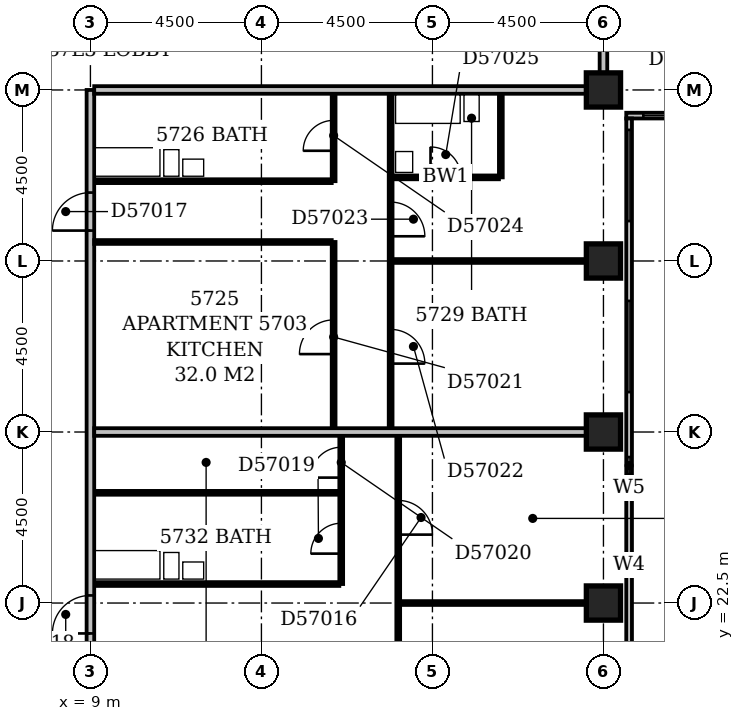
"""IFC4 building model, lengths in metres.
Left out: names, types, materials, properties, quantities, classifications, styles, units other than length and angle.
Written with IfcOpenShell. Run it as: python <this file> out.ifc"""

import sys

from ifc_helpers import new_model, si_unit, direction, frame, frame_2d, origin, origin_2d, place, context, subcontext, project, spatial, rectangle, extrude, element, fill, save


model = new_model("IFC4")
c1 = context("Model", 3, precision=1e-05, world=origin(), true_north=direction((0.0, 1.0)))
c2 = subcontext(c1, "Body", "Model", "MODEL_VIEW")
j1 = project(units=[si_unit("LENGTHUNIT", "METRE"), si_unit("PLANEANGLEUNIT", "RADIAN")], contexts=[c1])
p1 = place(None, origin())
s1 = spatial("IfcSite", under=j1, at=p1, CompositionType="ELEMENT")
p2 = place(p1, origin())
s2 = spatial("IfcBuilding", under=s1, at=p2, CompositionType="ELEMENT")
p3 = place(p2, frame((0.0, 0.0, 222.2)))
s3 = spatial("IfcBuildingStorey", under=s2, at=p3, CompositionType="ELEMENT", Elevation=222.2)
for number, where, z_axis, x_axis in (
    (1, (22.5, 22.5, -0.3), (0.0, 0.0, 1.0), (1.0, 0.0, 0.0)),
    (2, (22.5, 27.0, -0.3), (0.0, 0.0, 1.0), (1.0, 0.0, 0.0)),
    (3, (22.5, 31.5, -0.3), (0.0, 0.0, 1.0), (1.0, 0.0, 0.0)),
    (4, (22.5, 36.0, -0.3), (0.0, 0.0, 1.0), (1.0, 0.0, 0.0)),
):
    element("IfcColumn", number, at=place(p3, frame(where, z_axis=z_axis, x_axis=x_axis)), inside=s3, PredefinedType="COLUMN", context=c2, shape_type="SweptSolid", body=[
        extrude(rectangle(XDim=0.9, YDim=0.9, at=origin_2d()), origin(), (0.0, 0.0, 1.0), 3.6),
    ])
p4 = place(p3, frame((23.175, 17.4, 0.0), z_axis=(0.0, 0.0, 1.0), x_axis=(0.0, 1.0, 0.0)))
e5 = element("IfcWall", 5, at=p4, inside=s3, PredefinedType="STANDARD", context=c2, shape_type="SweptSolid", body=[
    extrude(rectangle(XDim=17.85, YDim=0.15, at=frame_2d((8.925, 0.0))), origin(), (0.0, 0.0, 1.0), 2.7),
])
p5 = place(p4, frame((1.65, 0.0, 0.6)))
e6 = element("IfcOpeningElement", 6, at=p5, cuts=e5, PredefinedType="OPENING", context=c2, shape_type="SweptSolid", body=[
    extrude(rectangle(XDim=2.4, YDim=1.8, at=frame_2d((1.2, 0.9))), frame((0.0, 0.087, 0.0), z_axis=(0.0, -1.0, 0.0), x_axis=(1.0, 0.0, 0.0)), (0.0, 0.0, 1.0), 0.174),
])
p6 = place(p4, frame((5.798, 0.0, 0.6)))
e7 = element("IfcOpeningElement", 7, at=p6, cuts=e5, PredefinedType="OPENING", context=c2, shape_type="SweptSolid", body=[
    extrude(rectangle(XDim=0.6, YDim=1.8, at=frame_2d((0.3, 0.9))), frame((0.0, 0.087, 0.0), z_axis=(0.0, -1.0, 0.0), x_axis=(1.0, 0.0, 0.0)), (0.0, 0.0, 1.0), 0.174),
])
p7 = place(p4, frame((8.491, 0.0, 0.6)))
e8 = element("IfcOpeningElement", 8, at=p7, cuts=e5, PredefinedType="OPENING", context=c2, shape_type="SweptSolid", body=[
    extrude(rectangle(XDim=0.45, YDim=1.8, at=frame_2d((0.225, 0.9))), frame((0.0, 0.087, 0.0), z_axis=(0.0, -1.0, 0.0), x_axis=(1.0, 0.0, 0.0)), (0.0, 0.0, 1.0), 0.174),
])
p8 = place(p4, frame((10.65, 0.0, 0.6)))
e9 = element("IfcOpeningElement", 9, at=p8, cuts=e5, PredefinedType="OPENING", context=c2, shape_type="SweptSolid", body=[
    extrude(rectangle(XDim=2.4, YDim=1.8, at=frame_2d((1.2, 0.9))), frame((0.0, 0.087, 0.0), z_axis=(0.0, -1.0, 0.0), x_axis=(1.0, 0.0, 0.0)), (0.0, 0.0, 1.0), 0.174),
])
p9 = place(p4, frame((15.15, 0.0, 0.6)))
e10 = element("IfcOpeningElement", 10, at=p9, cuts=e5, PredefinedType="OPENING", context=c2, shape_type="SweptSolid", body=[
    extrude(rectangle(XDim=2.4, YDim=1.8, at=frame_2d((1.2, 0.9))), frame((0.0, 0.087, 0.0), z_axis=(0.0, -1.0, 0.0), x_axis=(1.0, 0.0, 0.0)), (0.0, 0.0, 1.0), 0.174),
])
p10 = place(p3, frame((23.1, 35.325, 0.0), z_axis=(0.0, 0.0, 1.0), x_axis=(1.0, 0.0, 0.0)))
e11 = element("IfcWall", 11, at=p10, inside=s3, PredefinedType="STANDARD", context=c2, shape_type="SweptSolid", body=[
    extrude(rectangle(XDim=27.15, YDim=0.15, at=frame_2d((13.575, 0.0))), origin(), (0.0, 0.0, 1.0), 2.7),
])
p11 = place(p10, frame((0.45, 0.0, 0.6)))
e12 = element("IfcOpeningElement", 12, at=p11, cuts=e11, PredefinedType="OPENING", context=c2, shape_type="SweptSolid", body=[
    extrude(rectangle(XDim=2.4, YDim=1.8, at=frame_2d((1.2, 0.9))), frame((0.0, 0.087, 0.0), z_axis=(0.0, -1.0, 0.0), x_axis=(1.0, 0.0, 0.0)), (0.0, 0.0, 1.0), 0.174),
])
p12 = place(p10, frame((6.234, 0.0, 0.6)))
e13 = element("IfcOpeningElement", 13, at=p12, cuts=e11, PredefinedType="OPENING", context=c2, shape_type="SweptSolid", body=[
    extrude(rectangle(XDim=1.5, YDim=1.8, at=frame_2d((0.75, 0.9))), frame((0.0, 0.087, 0.0), z_axis=(0.0, -1.0, 0.0), x_axis=(1.0, 0.0, 0.0)), (0.0, 0.0, 1.0), 0.174),
])
p13 = place(p10, frame((9.45, 0.0, 0.6)))
e14 = element("IfcOpeningElement", 14, at=p13, cuts=e11, PredefinedType="OPENING", context=c2, shape_type="SweptSolid", body=[
    extrude(rectangle(XDim=2.4, YDim=1.8, at=frame_2d((1.2, 0.9))), frame((0.0, 0.087, 0.0), z_axis=(0.0, -1.0, 0.0), x_axis=(1.0, 0.0, 0.0)), (0.0, 0.0, 1.0), 0.174),
])
p14 = place(p10, frame((13.95, 0.0, 0.6)))
e15 = element("IfcOpeningElement", 15, at=p14, cuts=e11, PredefinedType="OPENING", context=c2, shape_type="SweptSolid", body=[
    extrude(rectangle(XDim=2.4, YDim=1.8, at=frame_2d((1.2, 0.9))), frame((0.0, 0.087, 0.0), z_axis=(0.0, -1.0, 0.0), x_axis=(1.0, 0.0, 0.0)), (0.0, 0.0, 1.0), 0.174),
])
p15 = place(p10, frame((18.18, 0.0, 0.6)))
e16 = element("IfcOpeningElement", 16, at=p15, cuts=e11, PredefinedType="OPENING", context=c2, shape_type="SweptSolid", body=[
    extrude(rectangle(XDim=1.8, YDim=1.8, at=frame_2d((0.9, 0.9))), frame((0.0, 0.087, 0.0), z_axis=(0.0, -1.0, 0.0), x_axis=(1.0, 0.0, 0.0)), (0.0, 0.0, 1.0), 0.174),
])
p16 = place(p10, frame((22.95, 0.0, 0.6)))
e17 = element("IfcOpeningElement", 17, at=p16, cuts=e11, PredefinedType="OPENING", context=c2, shape_type="SweptSolid", body=[
    extrude(rectangle(XDim=2.4, YDim=1.8, at=frame_2d((1.2, 0.9))), frame((0.0, 0.087, 0.0), z_axis=(0.0, -1.0, 0.0), x_axis=(1.0, 0.0, 0.0)), (0.0, 0.0, 1.0), 0.174),
])
p17 = place(p3, frame((17.1, 17.4, 0.0), z_axis=(0.0, 0.0, 1.0), x_axis=(0.0, 1.0, 0.0)))
e18 = element("IfcWall", 18, at=p17, inside=s3, PredefinedType="PARTITIONING", context=c2, shape_type="SweptSolid", body=[
    extrude(rectangle(XDim=9.5, YDim=0.1, at=frame_2d((4.75, 0.0))), origin(), (0.0, 0.0, 1.0), 3.3),
])
p18 = place(p17, frame((2.4, 0.0, 0.0)))
e19 = element("IfcOpeningElement", 19, at=p18, cuts=e18, PredefinedType="OPENING", context=c2, shape_type="SweptSolid", body=[
    extrude(rectangle(XDim=0.9, YDim=2.1, at=frame_2d((0.45, 1.05))), frame((0.0, 0.062, 0.0), z_axis=(0.0, -1.0, 0.0), x_axis=(1.0, 0.0, 0.0)), (0.0, 0.0, 1.0), 0.124),
])
p19 = place(p17, frame((6.9, 0.0, 0.0)))
e20 = element("IfcOpeningElement", 20, at=p19, cuts=e18, PredefinedType="OPENING", context=c2, shape_type="SweptSolid", body=[
    extrude(rectangle(XDim=0.9, YDim=2.1, at=frame_2d((0.45, 1.05))), frame((0.0, 0.062, 0.0), z_axis=(0.0, -1.0, 0.0), x_axis=(1.0, 0.0, 0.0)), (0.0, 0.0, 1.0), 0.124),
])
p20 = place(p3, frame((9.0, 18.45, 0.0), z_axis=(0.0, 0.0, 1.0), x_axis=(0.0, 1.0, 0.0)))
e21 = element("IfcWall", 21, at=p20, inside=s3, PredefinedType="PARTITIONING", context=c2, shape_type="SweptSolid", body=[
    extrude(rectangle(XDim=17.55, YDim=0.2, at=frame_2d((8.775, 0.0))), origin(), (0.0, 0.0, 1.0), 3.3),
])
p21 = place(p20, frame((13.85, 0.0, 0.0)))
e22 = element("IfcOpeningElement", 22, at=p21, cuts=e21, PredefinedType="OPENING", context=c2, shape_type="SweptSolid", body=[
    extrude(rectangle(XDim=1.0, YDim=2.1, at=frame_2d((0.5, 1.05))), frame((0.0, 0.112, 0.0), z_axis=(0.0, -1.0, 0.0), x_axis=(1.0, 0.0, 0.0)), (0.0, 0.0, 1.0), 0.224),
])
p22 = place(p20, frame((3.25, 0.0, 0.0)))
e23 = element("IfcOpeningElement", 23, at=p22, cuts=e21, PredefinedType="OPENING", context=c2, shape_type="SweptSolid", body=[
    extrude(rectangle(XDim=1.0, YDim=2.1, at=frame_2d((0.5, 1.05))), frame((0.0, 0.112, 0.0), z_axis=(0.0, -1.0, 0.0), x_axis=(1.0, 0.0, 0.0)), (0.0, 0.0, 1.0), 0.224),
])
p23 = place(p3, frame((17.15, 22.5, 0.0), z_axis=(0.0, 0.0, 1.0), x_axis=(1.0, 0.0, 0.0)))
e24 = element("IfcWall", 24, at=p23, inside=s3, PredefinedType="PARTITIONING", context=c2, shape_type="SweptSolid", body=[
    extrude(rectangle(XDim=4.9, YDim=0.1, at=frame_2d((2.45, 0.0))), origin(), (0.0, 0.0, 1.0), 3.3),
])
p24 = place(p3, frame((9.1, 23.0, 0.0), z_axis=(0.0, 0.0, 1.0), x_axis=(1.0, 0.0, 0.0)))
e25 = element("IfcWall", 25, at=p24, inside=s3, PredefinedType="PLUMBINGWALL", context=c2, shape_type="SweptSolid", body=[
    extrude(rectangle(XDim=6.45, YDim=0.1, at=frame_2d((3.225, 0.0))), origin(), (0.0, 0.0, 1.0), 3.3),
])
p25 = place(p3, frame((15.6, 23.0, 0.0), z_axis=(0.0, 0.0, 1.0), x_axis=(0.0, 1.0, 0.0)))
e26 = element("IfcWall", 26, at=p25, inside=s3, PredefinedType="PARTITIONING", context=c2, shape_type="SweptSolid", body=[
    extrude(rectangle(XDim=3.9, YDim=0.1, at=frame_2d((1.95, 0.0))), origin(), (0.0, 0.0, 1.0), 3.3),
])
p26 = place(p25, frame((0.8, 0.0, 0.0)))
e27 = element("IfcOpeningElement", 27, at=p26, cuts=e26, PredefinedType="OPENING", context=c2, shape_type="SweptSolid", body=[
    extrude(rectangle(XDim=0.8, YDim=2.1, at=frame_2d((0.4, 1.05))), frame((0.0, 0.062, 0.0), z_axis=(0.0, -1.0, 0.0), x_axis=(1.0, 0.0, 0.0)), (0.0, 0.0, 1.0), 0.124),
])
p27 = place(p25, frame((2.8, 0.0, 0.0)))
e28 = element("IfcOpeningElement", 28, at=p27, cuts=e26, PredefinedType="OPENING", context=c2, shape_type="SweptSolid", body=[
    extrude(rectangle(XDim=0.8, YDim=2.1, at=frame_2d((0.4, 1.05))), frame((0.0, 0.062, 0.0), z_axis=(0.0, -1.0, 0.0), x_axis=(1.0, 0.0, 0.0)), (0.0, 0.0, 1.0), 0.124),
])
p28 = place(p3, frame((9.1, 25.4, 0.0), z_axis=(0.0, 0.0, 1.0), x_axis=(1.0, 0.0, 0.0)))
e29 = element("IfcWall", 29, at=p28, inside=s3, PredefinedType="PLUMBINGWALL", context=c2, shape_type="SweptSolid", body=[
    extrude(rectangle(XDim=6.45, YDim=0.1, at=frame_2d((3.225, 0.0))), origin(), (0.0, 0.0, 1.0), 3.3),
])
p29 = place(p3, frame((9.1, 27.0, 0.0), z_axis=(0.0, 0.0, 1.0), x_axis=(1.0, 0.0, 0.0)))
e30 = element("IfcWall", 30, at=p29, inside=s3, PredefinedType="PARTITIONING", context=c2, shape_type="SweptSolid", body=[
    extrude(rectangle(XDim=12.95, YDim=0.2, at=frame_2d((6.475, 0.0))), origin(), (0.0, 0.0, 1.0), 2.7),
])
p30 = place(p3, frame((15.4, 27.1, 0.0), z_axis=(0.0, 0.0, 1.0), x_axis=(0.0, 1.0, 0.0)))
e31 = element("IfcWall", 31, at=p30, inside=s3, PredefinedType="PARTITIONING", context=c2, shape_type="SweptSolid", body=[
    extrude(rectangle(XDim=4.9, YDim=0.1, at=frame_2d((2.45, 0.0))), origin(), (0.0, 0.0, 1.0), 3.3),
])
p31 = place(p30, frame((1.95, 0.0, 0.0)))
e32 = element("IfcOpeningElement", 32, at=p31, cuts=e31, PredefinedType="OPENING", context=c2, shape_type="SweptSolid", body=[
    extrude(rectangle(XDim=0.9, YDim=2.1, at=frame_2d((0.45, 1.05))), frame((0.0, 0.062, 0.0), z_axis=(0.0, -1.0, 0.0), x_axis=(1.0, 0.0, 0.0)), (0.0, 0.0, 1.0), 0.124),
])
p32 = place(p3, frame((16.9, 27.1, 0.0), z_axis=(0.0, 0.0, 1.0), x_axis=(0.0, 1.0, 0.0)))
e33 = element("IfcWall", 33, at=p32, inside=s3, PredefinedType="PARTITIONING", context=c2, shape_type="SweptSolid", body=[
    extrude(rectangle(XDim=8.8, YDim=0.1, at=frame_2d((4.4, 0.0))), origin(), (0.0, 0.0, 1.0), 3.3),
])
p33 = place(p32, frame((1.7, 0.0, 0.0)))
e34 = element("IfcOpeningElement", 34, at=p33, cuts=e33, PredefinedType="OPENING", context=c2, shape_type="SweptSolid", body=[
    extrude(rectangle(XDim=0.9, YDim=2.1, at=frame_2d((0.45, 1.05))), frame((0.0, 0.062, 0.0), z_axis=(0.0, -1.0, 0.0), x_axis=(1.0, 0.0, 0.0)), (0.0, 0.0, 1.0), 0.124),
])
p34 = place(p32, frame((5.05, 0.0, 0.0)))
e35 = element("IfcOpeningElement", 35, at=p34, cuts=e33, PredefinedType="OPENING", context=c2, shape_type="SweptSolid", body=[
    extrude(rectangle(XDim=0.9, YDim=2.1, at=frame_2d((0.45, 1.05))), frame((0.0, 0.062, 0.0), z_axis=(0.0, -1.0, 0.0), x_axis=(1.0, 0.0, 0.0)), (0.0, 0.0, 1.0), 0.124),
])
p35 = place(p3, frame((16.95, 31.5, 0.0), z_axis=(0.0, 0.0, 1.0), x_axis=(1.0, 0.0, 0.0)))
e36 = element("IfcWall", 36, at=p35, inside=s3, PredefinedType="PARTITIONING", context=c2, shape_type="SweptSolid", body=[
    extrude(rectangle(XDim=5.1, YDim=0.1, at=frame_2d((2.55, 0.0))), origin(), (0.0, 0.0, 1.0), 3.3),
])
p36 = place(p3, frame((9.1, 32.0, 0.0), z_axis=(0.0, 0.0, 1.0), x_axis=(1.0, 0.0, 0.0)))
e37 = element("IfcWall", 37, at=p36, inside=s3, PredefinedType="PARTITIONING", context=c2, shape_type="SweptSolid", body=[
    extrude(rectangle(XDim=6.25, YDim=0.1, at=frame_2d((3.125, 0.0))), origin(), (0.0, 0.0, 1.0), 3.3),
])
p37 = place(p3, frame((9.1, 33.6, 0.0), z_axis=(0.0, 0.0, 1.0), x_axis=(1.0, 0.0, 0.0)))
e38 = element("IfcWall", 38, at=p37, inside=s3, PredefinedType="PLUMBINGWALL", context=c2, shape_type="SweptSolid", body=[
    extrude(rectangle(XDim=6.25, YDim=0.1, at=frame_2d((3.125, 0.0))), origin(), (0.0, 0.0, 1.0), 3.3),
])
p38 = place(p3, frame((15.4, 33.6, 0.0), z_axis=(0.0, 0.0, 1.0), x_axis=(0.0, 1.0, 0.0)))
e39 = element("IfcWall", 39, at=p38, inside=s3, PredefinedType="PARTITIONING", context=c2, shape_type="SweptSolid", body=[
    extrude(rectangle(XDim=2.3, YDim=0.1, at=frame_2d((1.15, 0.0))), origin(), (0.0, 0.0, 1.0), 3.3),
])
p39 = place(p38, frame((0.8, 0.0, 0.0)))
e40 = element("IfcOpeningElement", 40, at=p39, cuts=e39, PredefinedType="OPENING", context=c2, shape_type="SweptSolid", body=[
    extrude(rectangle(XDim=0.8, YDim=2.1, at=frame_2d((0.4, 1.05))), frame((0.0, 0.062, 0.0), z_axis=(0.0, -1.0, 0.0), x_axis=(1.0, 0.0, 0.0)), (0.0, 0.0, 1.0), 0.124),
])
p40 = place(p3, frame((16.95, 33.7, 0.0), z_axis=(0.0, 0.0, 1.0), x_axis=(1.0, 0.0, 0.0)))
e41 = element("IfcWall", 41, at=p40, inside=s3, PredefinedType="PLUMBINGWALL", context=c2, shape_type="SweptSolid", body=[
    extrude(rectangle(XDim=2.8, YDim=0.1, at=frame_2d((1.4, 0.0))), origin(), (0.0, 0.0, 1.0), 3.3),
])
p41 = place(p40, frame((1.0, 0.0, 0.0)))
e42 = element("IfcOpeningElement", 42, at=p41, cuts=e41, PredefinedType="OPENING", context=c2, shape_type="SweptSolid", body=[
    extrude(rectangle(XDim=0.8, YDim=2.1, at=frame_2d((0.4, 1.05))), frame((0.0, 0.062, 0.0), z_axis=(0.0, -1.0, 0.0), x_axis=(1.0, 0.0, 0.0)), (0.0, 0.0, 1.0), 0.124),
])
p42 = place(p3, frame((19.8, 33.7, 0.0), z_axis=(0.0, 0.0, 1.0), x_axis=(0.0, 1.0, 0.0)))
e43 = element("IfcWall", 43, at=p42, inside=s3, PredefinedType="PLUMBINGWALL", context=c2, shape_type="SweptSolid", body=[
    extrude(rectangle(XDim=2.2, YDim=0.1, at=frame_2d((1.1, 0.0))), origin(), (0.0, 0.0, 1.0), 3.3),
])
p43 = place(p3, frame((9.1, 36.0, 0.0), z_axis=(0.0, 0.0, 1.0), x_axis=(1.0, 0.0, 0.0)))
e44 = element("IfcWall", 44, at=p43, inside=s3, PredefinedType="PARTITIONING", context=c2, shape_type="SweptSolid", body=[
    extrude(rectangle(XDim=12.95, YDim=0.2, at=frame_2d((6.475, 0.0))), origin(), (0.0, 0.0, 1.0), 3.3),
])
p44 = place(p3, frame((22.5, 36.45, 0.0), z_axis=(0.0, 0.0, 1.0), x_axis=(0.0, 1.0, 0.0)))
e45 = element("IfcWall", 45, at=p44, inside=s3, PredefinedType="PARTITIONING", context=c2, shape_type="SweptSolid", body=[
    extrude(rectangle(XDim=13.05, YDim=0.2, at=frame_2d((6.525, 0.0))), origin(), (0.0, 0.0, 1.0), 3.3),
])
p45 = place(p6, origin())
e46 = element("IfcWindow", 46, at=p45, inside=s3, PartitioningType="SINGLE_PANEL", PredefinedType="WINDOW", context=c2, shape_type="SweptSolid", body=[
    extrude(rectangle(XDim=0.6, YDim=1.8, at=frame_2d((0.3, 0.9))), frame((0.0, 0.03, 0.0), z_axis=(0.0, -1.0, 0.0), x_axis=(1.0, 0.0, 0.0)), (0.0, 0.0, 1.0), 0.06),
])
fill(e7, e46)
p46 = place(p7, origin())
e47 = element("IfcWindow", 47, at=p46, inside=s3, PartitioningType="SINGLE_PANEL", PredefinedType="WINDOW", context=c2, shape_type="SweptSolid", body=[
    extrude(rectangle(XDim=0.45, YDim=1.8, at=frame_2d((0.225, 0.9))), frame((0.0, 0.03, 0.0), z_axis=(0.0, -1.0, 0.0), x_axis=(1.0, 0.0, 0.0)), (0.0, 0.0, 1.0), 0.06),
])
fill(e8, e47)
p47 = place(p8, origin())
e48 = element("IfcWindow", 48, at=p47, inside=s3, PartitioningType="SINGLE_PANEL", PredefinedType="WINDOW", context=c2, shape_type="SweptSolid", body=[
    extrude(rectangle(XDim=2.4, YDim=1.8, at=frame_2d((1.2, 0.9))), frame((0.0, 0.03, 0.0), z_axis=(0.0, -1.0, 0.0), x_axis=(1.0, 0.0, 0.0)), (0.0, 0.0, 1.0), 0.06),
])
fill(e9, e48)
p48 = place(p9, origin())
e49 = element("IfcWindow", 49, at=p48, inside=s3, PartitioningType="SINGLE_PANEL", PredefinedType="WINDOW", context=c2, shape_type="SweptSolid", body=[
    extrude(rectangle(XDim=2.4, YDim=1.8, at=frame_2d((1.2, 0.9))), frame((0.0, 0.03, 0.0), z_axis=(0.0, -1.0, 0.0), x_axis=(1.0, 0.0, 0.0)), (0.0, 0.0, 1.0), 0.06),
])
fill(e10, e49)
p49 = place(p11, origin())
e50 = element("IfcWindow", 50, at=p49, inside=s3, PartitioningType="SINGLE_PANEL", PredefinedType="WINDOW", context=c2, shape_type="SweptSolid", body=[
    extrude(rectangle(XDim=2.4, YDim=1.8, at=frame_2d((1.2, 0.9))), frame((0.0, 0.03, 0.0), z_axis=(0.0, -1.0, 0.0), x_axis=(1.0, 0.0, 0.0)), (0.0, 0.0, 1.0), 0.06),
])
fill(e12, e50)
p50 = place(p19, frame((0.9, 0.0, 0.0), z_axis=(0.0, 0.0, 1.0), x_axis=(-1.0, 0.0, 0.0)))
e51 = element("IfcDoor", 51, at=p50, inside=s3, OperationType="SINGLE_SWING_RIGHT", PredefinedType="DOOR", context=c2, shape_type="SweptSolid", body=[
    extrude(rectangle(XDim=0.9, YDim=2.1, at=frame_2d((0.45, 1.05))), frame((0.0, 0.025, 0.0), z_axis=(0.0, -1.0, 0.0), x_axis=(1.0, 0.0, 0.0)), (0.0, 0.0, 1.0), 0.05),
])
fill(e20, e51)
p51 = place(p21, origin())
e52 = element("IfcDoor", 52, at=p51, inside=s3, OperationType="SINGLE_SWING_LEFT", PredefinedType="DOOR", context=c2, shape_type="SweptSolid", body=[
    extrude(rectangle(XDim=1.0, YDim=2.1, at=frame_2d((0.5, 1.05))), frame((0.0, 0.025, 0.0), z_axis=(0.0, -1.0, 0.0), x_axis=(1.0, 0.0, 0.0)), (0.0, 0.0, 1.0), 0.05),
])
fill(e22, e52)
p52 = place(p22, origin())
e53 = element("IfcDoor", 53, at=p52, inside=s3, OperationType="SINGLE_SWING_LEFT", PredefinedType="DOOR", context=c2, shape_type="SweptSolid", body=[
    extrude(rectangle(XDim=1.0, YDim=2.1, at=frame_2d((0.5, 1.05))), frame((0.0, 0.025, 0.0), z_axis=(0.0, -1.0, 0.0), x_axis=(1.0, 0.0, 0.0)), (0.0, 0.0, 1.0), 0.05),
])
fill(e23, e53)
p53 = place(p26, origin())
e54 = element("IfcDoor", 54, at=p53, inside=s3, OperationType="SINGLE_SWING_LEFT", PredefinedType="DOOR", context=c2, shape_type="SweptSolid", body=[
    extrude(rectangle(XDim=0.8, YDim=2.1, at=frame_2d((0.4, 1.05))), frame((0.0, 0.025, 0.0), z_axis=(0.0, -1.0, 0.0), x_axis=(1.0, 0.0, 0.0)), (0.0, 0.0, 1.0), 0.05),
])
fill(e27, e54)
p54 = place(p27, origin())
e55 = element("IfcDoor", 55, at=p54, inside=s3, OperationType="SINGLE_SWING_LEFT", PredefinedType="DOOR", context=c2, shape_type="SweptSolid", body=[
    extrude(rectangle(XDim=0.8, YDim=2.1, at=frame_2d((0.4, 1.05))), frame((0.0, 0.025, 0.0), z_axis=(0.0, -1.0, 0.0), x_axis=(1.0, 0.0, 0.0)), (0.0, 0.0, 1.0), 0.05),
])
fill(e28, e55)
p55 = place(p31, origin())
e56 = element("IfcDoor", 56, at=p55, inside=s3, OperationType="SINGLE_SWING_LEFT", PredefinedType="DOOR", context=c2, shape_type="SweptSolid", body=[
    extrude(rectangle(XDim=0.9, YDim=2.1, at=frame_2d((0.45, 1.05))), frame((0.0, 0.025, 0.0), z_axis=(0.0, -1.0, 0.0), x_axis=(1.0, 0.0, 0.0)), (0.0, 0.0, 1.0), 0.05),
])
fill(e32, e56)
p56 = place(p33, frame((0.9, 0.0, 0.0), z_axis=(0.0, 0.0, 1.0), x_axis=(-1.0, 0.0, 0.0)))
e57 = element("IfcDoor", 57, at=p56, inside=s3, OperationType="SINGLE_SWING_RIGHT", PredefinedType="DOOR", context=c2, shape_type="SweptSolid", body=[
    extrude(rectangle(XDim=0.9, YDim=2.1, at=frame_2d((0.45, 1.05))), frame((0.0, 0.025, 0.0), z_axis=(0.0, -1.0, 0.0), x_axis=(1.0, 0.0, 0.0)), (0.0, 0.0, 1.0), 0.05),
])
fill(e34, e57)
p57 = place(p34, frame((0.9, 0.0, 0.0), z_axis=(0.0, 0.0, 1.0), x_axis=(-1.0, 0.0, 0.0)))
e58 = element("IfcDoor", 58, at=p57, inside=s3, OperationType="SINGLE_SWING_RIGHT", PredefinedType="DOOR", context=c2, shape_type="SweptSolid", body=[
    extrude(rectangle(XDim=0.9, YDim=2.1, at=frame_2d((0.45, 1.05))), frame((0.0, 0.025, 0.0), z_axis=(0.0, -1.0, 0.0), x_axis=(1.0, 0.0, 0.0)), (0.0, 0.0, 1.0), 0.05),
])
fill(e35, e58)
p58 = place(p39, origin())
e59 = element("IfcDoor", 59, at=p58, inside=s3, OperationType="SINGLE_SWING_LEFT", PredefinedType="DOOR", context=c2, shape_type="SweptSolid", body=[
    extrude(rectangle(XDim=0.8, YDim=2.1, at=frame_2d((0.4, 1.05))), frame((0.0, 0.025, 0.0), z_axis=(0.0, -1.0, 0.0), x_axis=(1.0, 0.0, 0.0)), (0.0, 0.0, 1.0), 0.05),
])
fill(e40, e59)
p59 = place(p41, origin())
e60 = element("IfcDoor", 60, at=p59, inside=s3, OperationType="SINGLE_SWING_LEFT", PredefinedType="DOOR", context=c2, shape_type="SweptSolid", body=[
    extrude(rectangle(XDim=0.8, YDim=2.1, at=frame_2d((0.4, 1.05))), frame((0.0, 0.025, 0.0), z_axis=(0.0, -1.0, 0.0), x_axis=(1.0, 0.0, 0.0)), (0.0, 0.0, 1.0), 0.05),
])
fill(e42, e60)
save(model, sys.argv[1])
